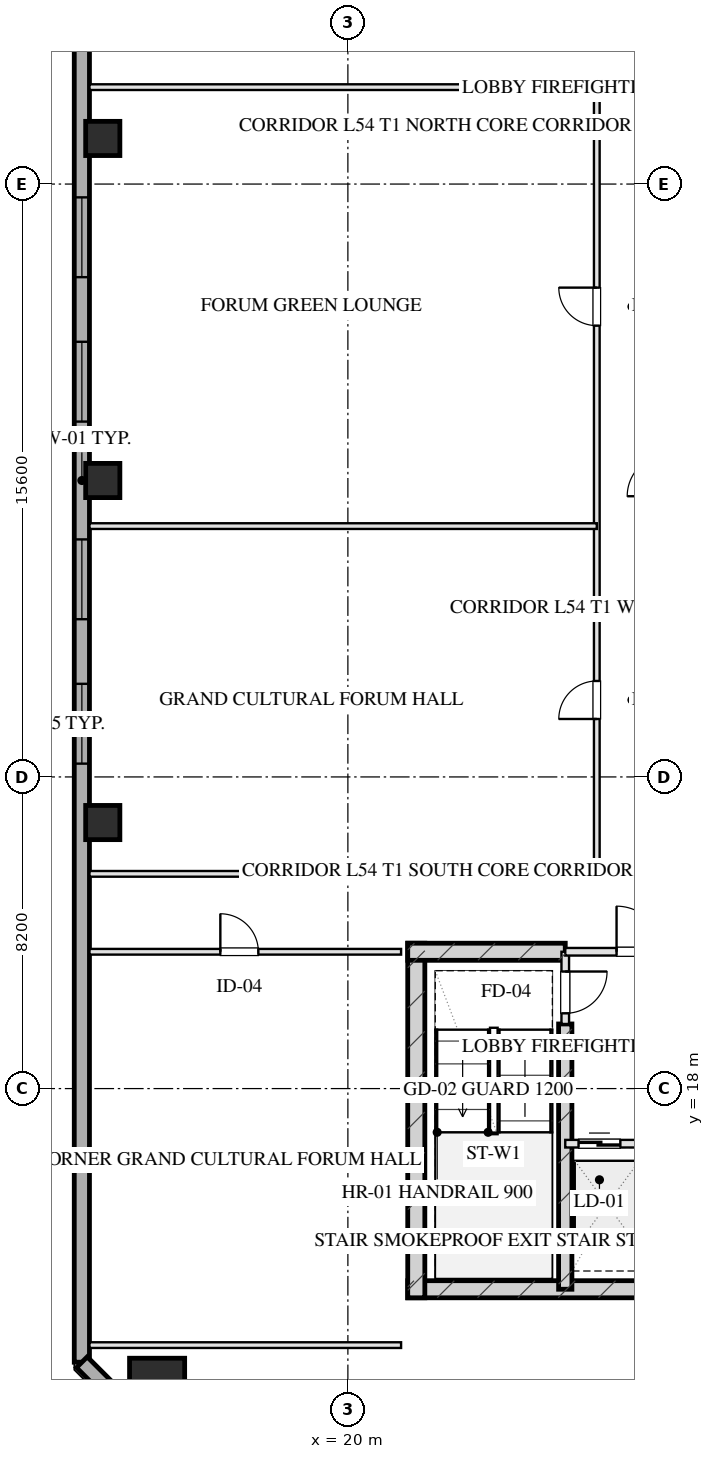
"""IFC4 building model, lengths in metres.
Left out: names, types, materials, properties, quantities, classifications, styles, units other than length and angle.
Written with IfcOpenShell. Run it as: python <this file> out.ifc"""

import sys

from ifc_helpers import new_model, si_unit, direction, frame, frame_2d, origin, origin_2d, place, context, subcontext, project, spatial, rectangle, hollow_rectangle, extrude, element, fill, save


model = new_model("IFC4")
c1 = context("Model", 3, precision=1e-05, world=origin(), true_north=direction((0.0, 1.0)))
c2 = subcontext(c1, "Body", "Model", "MODEL_VIEW")
j1 = project(units=[si_unit("LENGTHUNIT", "METRE"), si_unit("PLANEANGLEUNIT", "RADIAN")], contexts=[c1])
p1 = place(None, origin())
s1 = spatial("IfcSite", under=j1, at=p1, CompositionType="ELEMENT")
p2 = place(p1, origin())
s2 = spatial("IfcBuilding", under=s1, at=p2, CompositionType="ELEMENT")
p3 = place(p2, frame((0.0, 0.0, 202.4)))
s3 = spatial("IfcBuildingStorey", under=s2, at=p3, CompositionType="ELEMENT", Elevation=202.4)
p4 = place(p3, frame((21.575, 12.72, 0.0), z_axis=(0.0, 0.0, 1.0), x_axis=(1.0, 0.0, 0.0)))
e1 = element("IfcWall", 1, at=p4, inside=s3, PredefinedType="SHEAR", context=c2, shape_type="SweptSolid", body=[
    extrude(rectangle(XDim=16.85, YDim=0.45, at=frame_2d((8.425, 0.0))), origin(), (0.0, 0.0, 1.0), 3.45),
])
p5 = place(p3, frame((21.8, 21.825, 0.0), z_axis=(0.0, 0.0, 1.0), x_axis=(0.0, -1.0, 0.0)))
e2 = element("IfcWall", 2, at=p5, inside=s3, PredefinedType="SHEAR", context=c2, shape_type="SweptSolid", body=[
    extrude(rectangle(XDim=9.33, YDim=0.45, at=frame_2d((4.665, 0.0))), origin(), (0.0, 0.0, 1.0), 3.45),
])
p6 = place(p3, frame((25.72, 19.7, 0.0), z_axis=(0.0, 0.0, 1.0), x_axis=(0.0, -1.0, 0.0)))
e3 = element("IfcWall", 3, at=p6, inside=s3, PredefinedType="SHEAR", context=c2, shape_type="SweptSolid", body=[
    extrude(rectangle(XDim=6.98, YDim=0.35, at=frame_2d((3.49, 0.0))), origin(), (0.0, 0.0, 1.0), 3.45),
])
p7 = place(p3, frame((21.575, 21.6, 0.0), z_axis=(0.0, 0.0, 1.0), x_axis=(1.0, 0.0, 0.0)))
e4 = element("IfcWall", 4, at=p7, inside=s3, PredefinedType="SHEAR", context=c2, shape_type="SweptSolid", body=[
    extrude(rectangle(XDim=4.145, YDim=0.45, at=frame_2d((2.073, 0.0))), origin(), (0.0, 0.0, 1.0), 3.45),
])
p8 = place(p3, frame((14.98, 10.18, 0.0), z_axis=(0.0, 0.0, 1.0), x_axis=(1.0, 0.0, 0.0)))
e5 = element("IfcColumn", 5, at=p8, inside=s3, PredefinedType="COLUMN", context=c2, shape_type="SweptSolid", body=[
    extrude(hollow_rectangle(XDim=1.45, YDim=1.45, WallThickness=0.05, at=origin_2d()), origin(), (0.0, 0.0, 1.0), 3.451),
])
for number, where, z_axis, x_axis in (
    (6, (13.55, 25.0, 0.0), (0.0, 0.0, 1.0), (1.0, 0.0, 0.0)),
    (7, (13.55, 34.0, 0.0), (0.0, 0.0, 1.0), (1.0, 0.0, 0.0)),
    (8, (13.55, 43.0, 0.0), (0.0, 0.0, 1.0), (1.0, 0.0, 0.0)),
):
    element("IfcColumn", number, at=place(p3, frame(where, z_axis=z_axis, x_axis=x_axis)), inside=s3, PredefinedType="COLUMN", context=c2, shape_type="SweptSolid", body=[
        extrude(hollow_rectangle(XDim=0.9, YDim=0.9, WallThickness=0.032, at=origin_2d()), origin(), (0.0, 0.0, 1.0), 3.451),
    ])
p9 = place(p3, frame((13.0, 10.8, 0.0), z_axis=(0.0, 0.0, 1.0), x_axis=(0.0, 1.0, 0.0)))
e9 = element("IfcWall", 9, at=p9, inside=s3, PredefinedType="SOLIDWALL", context=c2, shape_type="SweptSolid", body=[
    extrude(rectangle(XDim=46.4, YDim=0.4, at=frame_2d((23.2, 0.0))), origin(), (0.0, 0.0, 1.0), 2.61),
])
p10 = place(p9, frame((15.75, 0.0, 0.75)))
e10 = element("IfcOpeningElement", 10, at=p10, cuts=e9, PredefinedType="OPENING", context=c2, shape_type="SweptSolid", body=[
    extrude(rectangle(XDim=2.1, YDim=1.46, at=frame_2d((1.05, 0.73))), frame((0.0, 0.21, 0.0), z_axis=(0.0, -1.0, 0.0), x_axis=(1.0, 0.0, 0.0)), (0.0, 0.0, 1.0), 0.42),
])
p11 = place(p9, frame((19.55, 0.0, 0.75)))
e11 = element("IfcOpeningElement", 11, at=p11, cuts=e9, PredefinedType="OPENING", context=c2, shape_type="SweptSolid", body=[
    extrude(rectangle(XDim=2.1, YDim=1.46, at=frame_2d((1.05, 0.73))), frame((0.0, 0.21, 0.0), z_axis=(0.0, -1.0, 0.0), x_axis=(1.0, 0.0, 0.0)), (0.0, 0.0, 1.0), 0.42),
])
p12 = place(p9, frame((24.75, 0.0, 0.75)))
e12 = element("IfcOpeningElement", 12, at=p12, cuts=e9, PredefinedType="OPENING", context=c2, shape_type="SweptSolid", body=[
    extrude(rectangle(XDim=2.1, YDim=1.46, at=frame_2d((1.05, 0.73))), frame((0.0, 0.21, 0.0), z_axis=(0.0, -1.0, 0.0), x_axis=(1.0, 0.0, 0.0)), (0.0, 0.0, 1.0), 0.42),
])
p13 = place(p9, frame((28.55, 0.0, 0.75)))
e13 = element("IfcOpeningElement", 13, at=p13, cuts=e9, PredefinedType="OPENING", context=c2, shape_type="SweptSolid", body=[
    extrude(rectangle(XDim=2.1, YDim=1.46, at=frame_2d((1.05, 0.73))), frame((0.0, 0.21, 0.0), z_axis=(0.0, -1.0, 0.0), x_axis=(1.0, 0.0, 0.0)), (0.0, 0.0, 1.0), 0.42),
])
p14 = place(p3, frame((15.6, 8.2, 0.0), z_axis=(0.0, 0.0, 1.0), x_axis=(-0.707106781187, 0.707106781187, 0.0)))
e14 = element("IfcWall", 14, at=p14, inside=s3, PredefinedType="SOLIDWALL", context=c2, shape_type="SweptSolid", body=[
    extrude(rectangle(XDim=3.677, YDim=0.4, at=frame_2d((1.838, 0.0))), origin(), (0.0, 0.0, 1.0), 2.61),
])
p15 = place(p3, frame((25.72, 21.6, 0.0), z_axis=(0.0, 0.0, 1.0), x_axis=(0.0, -1.0, 0.0)))
e15 = element("IfcWall", 15, at=p15, inside=s3, PredefinedType="PARTITIONING", context=c2, shape_type="SweptSolid", body=[
    extrude(rectangle(XDim=1.9, YDim=0.2, at=frame_2d((0.95, 0.0))), origin(), (0.0, 0.0, 1.0), 3.175),
])
p16 = place(p15, frame((0.52, 0.0, 0.0)))
e16 = element("IfcOpeningElement", 16, at=p16, cuts=e15, PredefinedType="OPENING", context=c2, shape_type="SweptSolid", body=[
    extrude(rectangle(XDim=1.1, YDim=2.05, at=frame_2d((0.55, 1.025))), frame((0.0, 0.11, 0.0), z_axis=(0.0, -1.0, 0.0), x_axis=(1.0, 0.0, 0.0)), (0.0, 0.0, 1.0), 0.22),
])
p17 = place(p3, frame((25.72, 21.6, 0.0), z_axis=(0.0, 0.0, 1.0), x_axis=(1.0, 0.0, 0.0)))
e17 = element("IfcWall", 17, at=p17, inside=s3, PredefinedType="PARTITIONING", context=c2, shape_type="SweptSolid", body=[
    extrude(rectangle(XDim=3.83, YDim=0.2, at=frame_2d((1.915, 0.0))), origin(), (0.0, 0.0, 1.0), 3.175),
])
p18 = place(p17, frame((1.35, 0.0, 0.0)))
e18 = element("IfcOpeningElement", 18, at=p18, cuts=e17, PredefinedType="OPENING", context=c2, shape_type="SweptSolid", body=[
    extrude(rectangle(XDim=1.2, YDim=2.05, at=frame_2d((0.6, 1.025))), frame((0.0, 0.11, 0.0), z_axis=(0.0, -1.0, 0.0), x_axis=(1.0, 0.0, 0.0)), (0.0, 0.0, 1.0), 0.22),
])
p19 = place(p3, frame((25.72, 16.55, 0.0), z_axis=(0.0, 0.0, 1.0), x_axis=(1.0, 0.0, 0.0)))
e19 = element("IfcWall", 19, at=p19, inside=s3, PredefinedType="PARTITIONING", context=c2, shape_type="SweptSolid", body=[
    extrude(rectangle(XDim=2.1, YDim=0.2, at=frame_2d((1.05, 0.0))), origin(), (0.0, 0.0, 1.0), 3.175),
])
p20 = place(p19, frame((0.35, 0.0, 0.0)))
e20 = element("IfcOpeningElement", 20, at=p20, cuts=e19, PredefinedType="OPENING", context=c2, shape_type="SweptSolid", body=[
    extrude(rectangle(XDim=1.1, YDim=2.05, at=frame_2d((0.55, 1.025))), frame((0.0, 0.11, 0.0), z_axis=(0.0, -1.0, 0.0), x_axis=(1.0, 0.0, 0.0)), (0.0, 0.0, 1.0), 0.22),
])
p21 = place(p3, frame((13.2, 11.25, 0.0), z_axis=(0.0, 0.0, 1.0), x_axis=(1.0, 0.0, 0.0)))
e21 = element("IfcWall", 21, at=p21, inside=s3, PredefinedType="PARTITIONING", context=c2, shape_type="SweptSolid", body=[
    extrude(rectangle(XDim=8.2, YDim=0.15, at=frame_2d((4.1, 0.0))), origin(), (0.0, 0.0, 1.0), 3.175),
])
p22 = place(p3, frame((13.2, 21.6, 0.0), z_axis=(0.0, 0.0, 1.0), x_axis=(1.0, 0.0, 0.0)))
e22 = element("IfcWall", 22, at=p22, inside=s3, PredefinedType="PARTITIONING", context=c2, shape_type="SweptSolid", body=[
    extrude(rectangle(XDim=8.2, YDim=0.15, at=frame_2d((4.1, 0.0))), origin(), (0.0, 0.0, 1.0), 3.175),
])
p23 = place(p22, frame((3.444, 0.0, 0.0)))
e23 = element("IfcOpeningElement", 23, at=p23, cuts=e22, PredefinedType="OPENING", context=c2, shape_type="SweptSolid", body=[
    extrude(rectangle(XDim=1.0, YDim=2.05, at=frame_2d((0.5, 1.025))), frame((0.0, 0.085, 0.0), z_axis=(0.0, -1.0, 0.0), x_axis=(1.0, 0.0, 0.0)), (0.0, 0.0, 1.0), 0.17),
])
for number, where, z_axis, x_axis in (
    (24, (13.2, 23.65, 0.0), (0.0, 0.0, 1.0), (1.0, 0.0, 0.0)),
    (25, (13.2, 44.35, 0.0), (0.0, 0.0, 1.0), (1.0, 0.0, 0.0)),
):
    element("IfcWall", number, at=place(p3, frame(where, z_axis=z_axis, x_axis=x_axis)), inside=s3, PredefinedType="PARTITIONING", context=c2, shape_type="SweptSolid", body=[
        extrude(rectangle(XDim=13.35, YDim=0.15, at=frame_2d((6.675, 0.0))), origin(), (0.0, 0.0, 1.0), 3.175),
    ])
p24 = place(p3, frame((26.55, 23.65, 0.0), z_axis=(0.0, 0.0, 1.0), x_axis=(0.0, 1.0, 0.0)))
e26 = element("IfcWall", 26, at=p24, inside=s3, PredefinedType="PARTITIONING", context=c2, shape_type="SweptSolid", body=[
    extrude(rectangle(XDim=20.7, YDim=0.15, at=frame_2d((10.35, 0.0))), origin(), (0.0, 0.0, 1.0), 3.175),
])
p25 = place(p24, frame((4.075, 0.0, 0.0)))
e27 = element("IfcOpeningElement", 27, at=p25, cuts=e26, PredefinedType="OPENING", context=c2, shape_type="SweptSolid", body=[
    extrude(rectangle(XDim=1.0, YDim=2.05, at=frame_2d((0.5, 1.025))), frame((0.0, 0.085, 0.0), z_axis=(0.0, -1.0, 0.0), x_axis=(1.0, 0.0, 0.0)), (0.0, 0.0, 1.0), 0.17),
])
p26 = place(p24, frame((14.425, 0.0, 0.0)))
e28 = element("IfcOpeningElement", 28, at=p26, cuts=e26, PredefinedType="OPENING", context=c2, shape_type="SweptSolid", body=[
    extrude(rectangle(XDim=1.0, YDim=2.05, at=frame_2d((0.5, 1.025))), frame((0.0, 0.085, 0.0), z_axis=(0.0, -1.0, 0.0), x_axis=(1.0, 0.0, 0.0)), (0.0, 0.0, 1.0), 0.17),
])
p27 = place(p3, frame((13.2, 32.8, 0.0), z_axis=(0.0, 0.0, 1.0), x_axis=(1.0, 0.0, 0.0)))
e29 = element("IfcWall", 29, at=p27, inside=s3, PredefinedType="PARTITIONING", context=c2, shape_type="SweptSolid", body=[
    extrude(rectangle(XDim=13.35, YDim=0.15, at=frame_2d((6.675, 0.0))), origin(), (0.0, 0.0, 1.0), 3.175),
])
p28 = place(p10, origin())
e30 = element("IfcWindow", 30, at=p28, inside=s3, PartitioningType="TRIPLE_PANEL_VERTICAL", PredefinedType="WINDOW", context=c2, shape_type="SweptSolid", body=[
    extrude(rectangle(XDim=2.1, YDim=1.46, at=frame_2d((1.05, 0.73))), frame((0.0, 0.03, 0.0), z_axis=(0.0, -1.0, 0.0), x_axis=(1.0, 0.0, 0.0)), (0.0, 0.0, 1.0), 0.06),
])
fill(e10, e30)
p29 = place(p11, origin())
e31 = element("IfcWindow", 31, at=p29, inside=s3, PartitioningType="TRIPLE_PANEL_VERTICAL", PredefinedType="WINDOW", context=c2, shape_type="SweptSolid", body=[
    extrude(rectangle(XDim=2.1, YDim=1.46, at=frame_2d((1.05, 0.73))), frame((0.0, 0.03, 0.0), z_axis=(0.0, -1.0, 0.0), x_axis=(1.0, 0.0, 0.0)), (0.0, 0.0, 1.0), 0.06),
])
fill(e11, e31)
p30 = place(p12, origin())
e32 = element("IfcWindow", 32, at=p30, inside=s3, PartitioningType="TRIPLE_PANEL_VERTICAL", PredefinedType="WINDOW", context=c2, shape_type="SweptSolid", body=[
    extrude(rectangle(XDim=2.1, YDim=1.46, at=frame_2d((1.05, 0.73))), frame((0.0, 0.03, 0.0), z_axis=(0.0, -1.0, 0.0), x_axis=(1.0, 0.0, 0.0)), (0.0, 0.0, 1.0), 0.06),
])
fill(e12, e32)
p31 = place(p13, origin())
e33 = element("IfcWindow", 33, at=p31, inside=s3, PartitioningType="TRIPLE_PANEL_VERTICAL", PredefinedType="WINDOW", context=c2, shape_type="SweptSolid", body=[
    extrude(rectangle(XDim=2.1, YDim=1.46, at=frame_2d((1.05, 0.73))), frame((0.0, 0.03, 0.0), z_axis=(0.0, -1.0, 0.0), x_axis=(1.0, 0.0, 0.0)), (0.0, 0.0, 1.0), 0.06),
])
fill(e13, e33)
p32 = place(p16, origin())
e34 = element("IfcDoor", 34, at=p32, inside=s3, OperationType="SINGLE_SWING_LEFT", PredefinedType="DOOR", context=c2, shape_type="SweptSolid", body=[
    extrude(rectangle(XDim=1.1, YDim=2.05, at=frame_2d((0.55, 1.025))), frame((0.0, 0.025, 0.0), z_axis=(0.0, -1.0, 0.0), x_axis=(1.0, 0.0, 0.0)), (0.0, 0.0, 1.0), 0.05),
])
fill(e16, e34)
p33 = place(p18, origin())
e35 = element("IfcDoor", 35, at=p33, inside=s3, OperationType="SINGLE_SWING_LEFT", PredefinedType="DOOR", context=c2, shape_type="SweptSolid", body=[
    extrude(rectangle(XDim=1.2, YDim=2.05, at=frame_2d((0.6, 1.025))), frame((0.0, 0.025, 0.0), z_axis=(0.0, -1.0, 0.0), x_axis=(1.0, 0.0, 0.0)), (0.0, 0.0, 1.0), 0.05),
])
fill(e18, e35)
p34 = place(p20, origin())
e36 = element("IfcDoor", 36, at=p34, inside=s3, OperationType="DOUBLE_DOOR_SLIDING", PredefinedType="DOOR", context=c2, shape_type="SweptSolid", body=[
    extrude(rectangle(XDim=1.1, YDim=2.05, at=frame_2d((0.55, 1.025))), frame((0.0, 0.025, 0.0), z_axis=(0.0, -1.0, 0.0), x_axis=(1.0, 0.0, 0.0)), (0.0, 0.0, 1.0), 0.05),
])
fill(e20, e36)
p35 = place(p23, origin())
e37 = element("IfcDoor", 37, at=p35, inside=s3, OperationType="SINGLE_SWING_LEFT", PredefinedType="DOOR", context=c2, shape_type="SweptSolid", body=[
    extrude(rectangle(XDim=1.0, YDim=2.05, at=frame_2d((0.5, 1.025))), frame((0.0, 0.025, 0.0), z_axis=(0.0, -1.0, 0.0), x_axis=(1.0, 0.0, 0.0)), (0.0, 0.0, 1.0), 0.05),
])
fill(e23, e37)
p36 = place(p25, origin())
e38 = element("IfcDoor", 38, at=p36, inside=s3, OperationType="SINGLE_SWING_LEFT", PredefinedType="DOOR", context=c2, shape_type="SweptSolid", body=[
    extrude(rectangle(XDim=1.0, YDim=2.05, at=frame_2d((0.5, 1.025))), frame((0.0, 0.025, 0.0), z_axis=(0.0, -1.0, 0.0), x_axis=(1.0, 0.0, 0.0)), (0.0, 0.0, 1.0), 0.05),
])
fill(e27, e38)
p37 = place(p26, origin())
e39 = element("IfcDoor", 39, at=p37, inside=s3, OperationType="SINGLE_SWING_RIGHT", PredefinedType="DOOR", context=c2, shape_type="SweptSolid", body=[
    extrude(rectangle(XDim=1.0, YDim=2.05, at=frame_2d((0.5, 1.025))), frame((0.0, 0.025, 0.0), z_axis=(0.0, -1.0, 0.0), x_axis=(1.0, 0.0, 0.0)), (0.0, 0.0, 1.0), 0.05),
])
fill(e28, e39)
save(model, sys.argv[1])
